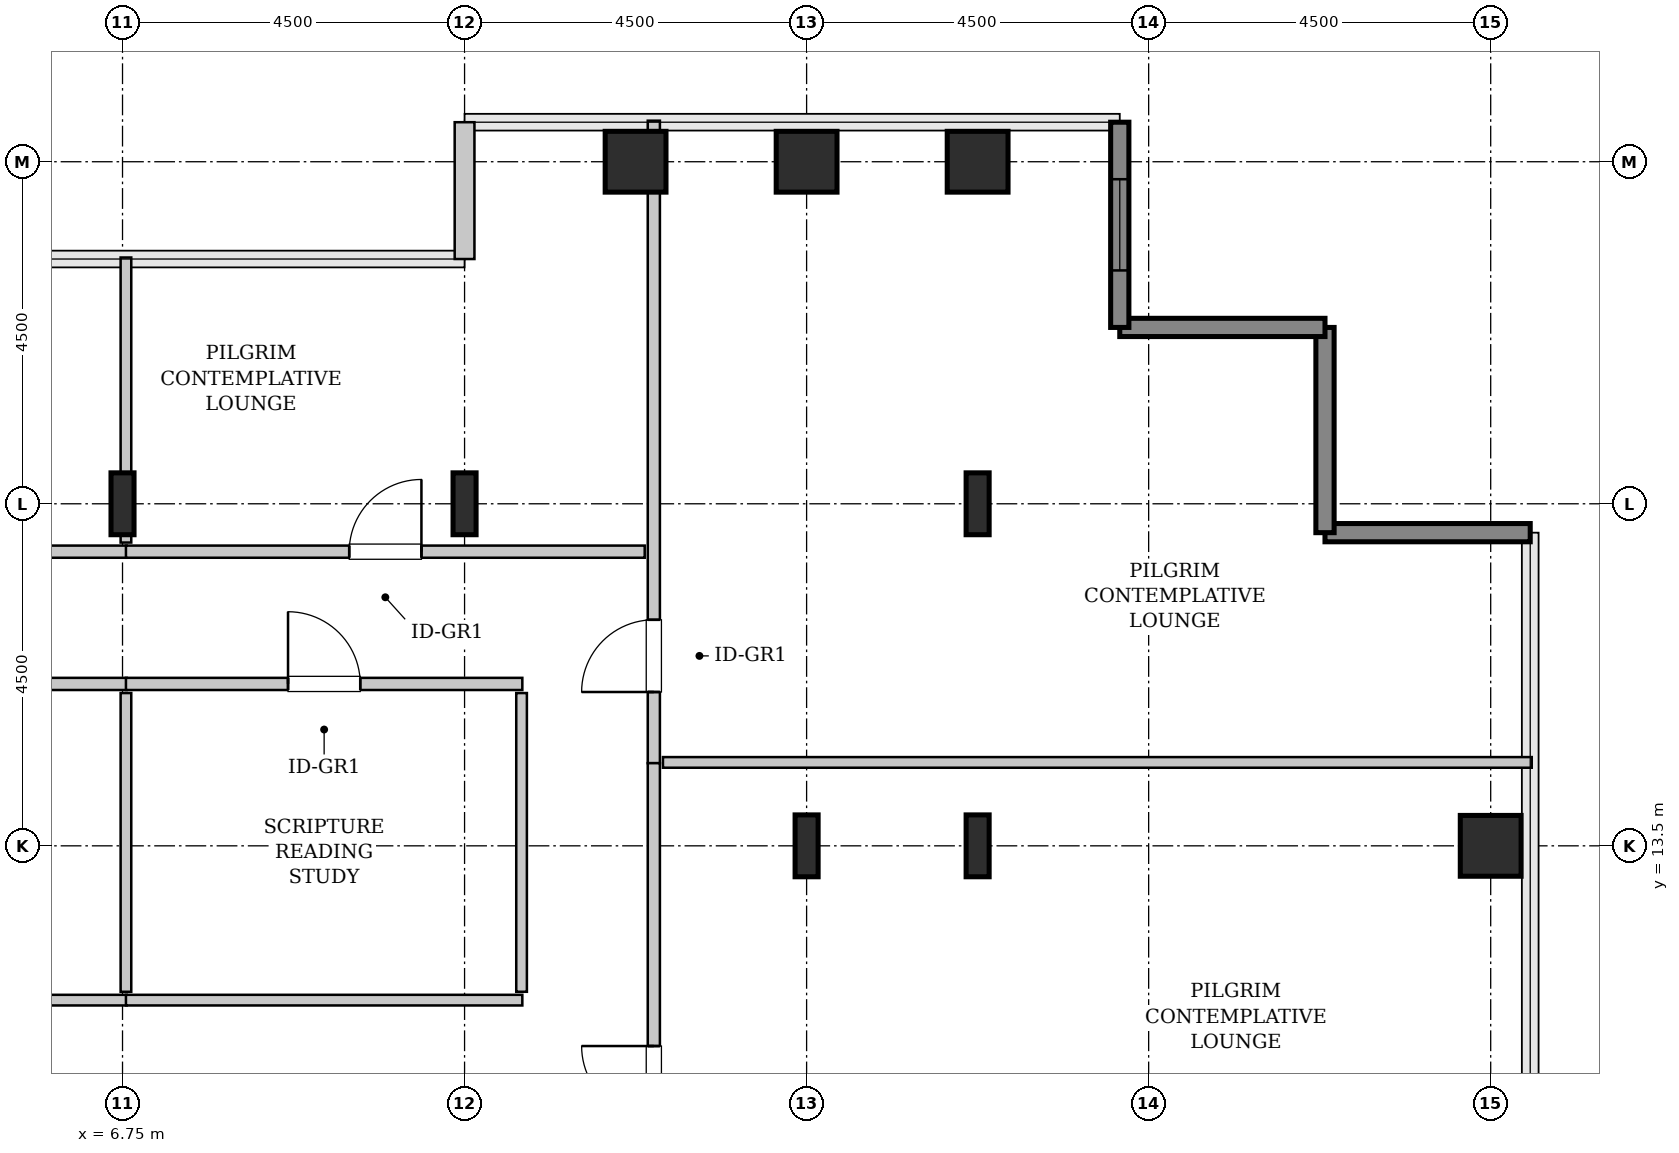
"""IFC4 building model, lengths in metres.
Left out: names, types, materials, properties, quantities, classifications, styles, units other than length and angle.
Written with IfcOpenShell. Run it as: python <this file> out.ifc"""

import sys

from ifc_helpers import new_model, si_unit, direction, frame, frame_2d, origin, origin_2d, place, context, subcontext, project, spatial, rectangle, hollow_rectangle, i_section, extrude, source, transform, mapped, element, fill, save


model = new_model("IFC4")
c1 = context("Model", 3, precision=1e-05, world=origin(), true_north=direction((0.0, 1.0)))
c2 = subcontext(c1, "Body", "Model", "MODEL_VIEW")
j1 = project(units=[si_unit("LENGTHUNIT", "METRE"), si_unit("PLANEANGLEUNIT", "RADIAN")], contexts=[c1])
p1 = place(None, origin())
s1 = spatial("IfcSite", under=j1, at=p1, CompositionType="ELEMENT")
p2 = place(p1, origin())
s2 = spatial("IfcBuilding", under=s1, at=p2, CompositionType="ELEMENT")
p3 = place(p2, frame((0.0, 0.0, 160.2)))
s3 = spatial("IfcBuildingStorey", under=s2, at=p3, CompositionType="ELEMENT", Elevation=160.2)
m1 = source(origin(), c2, "Body", "SweptSolid", [
    extrude(i_section(OverallWidth=0.303, OverallDepth=0.814, WebThickness=0.021, FlangeThickness=0.04, FilletRadius=0.03, at=origin_2d()), origin(), (0.0, 0.0, 1.0), 3.8),
])
for number, where, z_axis, x_axis in (
    (1, (6.75, 18.0, 0.0), (0.0, 0.0, 1.0), (1.0, 0.0, 0.0)),
    (2, (11.25, 18.0, 0.0), (0.0, 0.0, 1.0), (1.0, 0.0, 0.0)),
):
    element("IfcColumn", number, at=place(p3, frame(where, z_axis=z_axis, x_axis=x_axis)), inside=s3, PredefinedType="COLUMN", context=c2, shape_type="MappedRepresentation", body=[
        mapped(m1, transform((0.0, 0.0, 0.0), x_axis=(1.0, 0.0, 0.0), y_axis=(0.0, 1.0, 0.0), z_axis=(0.0, 0.0, 1.0), scale=1.0)),
    ])
m2 = source(origin(), c2, "Body", "SweptSolid", [
    extrude(hollow_rectangle(XDim=0.8, YDim=0.8, WallThickness=0.04, InnerFilletRadius=0.04, OuterFilletRadius=0.08, at=origin_2d()), origin(), (0.0, 0.0, 1.0), 3.8),
])
p4 = place(p3, frame((13.5, 22.5, 0.0), z_axis=(0.0, 0.0, 1.0), x_axis=(1.0, 0.0, 0.0)))
e3 = element("IfcColumn", 3, at=p4, inside=s3, PredefinedType="COLUMN", context=c2, shape_type="MappedRepresentation", body=[
    mapped(m2, transform((0.0, 0.0, 0.0), x_axis=(1.0, 0.0, 0.0), y_axis=(0.0, 1.0, 0.0), z_axis=(0.0, 0.0, 1.0), scale=1.0)),
])
p5 = place(p3, frame((15.75, 13.5, 0.0), z_axis=(0.0, 0.0, 1.0), x_axis=(1.0, 0.0, 0.0)))
e4 = element("IfcColumn", 4, at=p5, inside=s3, PredefinedType="COLUMN", context=c2, shape_type="MappedRepresentation", body=[
    mapped(m1, transform((0.0, 0.0, 0.0), x_axis=(1.0, 0.0, 0.0), y_axis=(0.0, 1.0, 0.0), z_axis=(0.0, 0.0, 1.0), scale=1.0)),
])
p6 = place(p3, frame((15.75, 22.5, 0.0), z_axis=(0.0, 0.0, 1.0), x_axis=(1.0, 0.0, 0.0)))
e5 = element("IfcColumn", 5, at=p6, inside=s3, PredefinedType="COLUMN", context=c2, shape_type="MappedRepresentation", body=[
    mapped(m2, transform((0.0, 0.0, 0.0), x_axis=(1.0, 0.0, 0.0), y_axis=(0.0, 1.0, 0.0), z_axis=(0.0, 0.0, 1.0), scale=1.0)),
])
for number, where, z_axis, x_axis in (
    (6, (18.0, 13.5, 0.0), (0.0, 0.0, 1.0), (1.0, 0.0, 0.0)),
    (7, (18.0, 18.0, 0.0), (0.0, 0.0, 1.0), (1.0, 0.0, 0.0)),
):
    element("IfcColumn", number, at=place(p3, frame(where, z_axis=z_axis, x_axis=x_axis)), inside=s3, PredefinedType="COLUMN", context=c2, shape_type="MappedRepresentation", body=[
        mapped(m1, transform((0.0, 0.0, 0.0), x_axis=(1.0, 0.0, 0.0), y_axis=(0.0, 1.0, 0.0), z_axis=(0.0, 0.0, 1.0), scale=1.0)),
    ])
for number, where, z_axis, x_axis in (
    (8, (18.0, 22.5, 0.0), (0.0, 0.0, 1.0), (1.0, 0.0, 0.0)),
    (9, (24.75, 13.5, 0.0), (0.0, 0.0, 1.0), (1.0, 0.0, 0.0)),
):
    element("IfcColumn", number, at=place(p3, frame(where, z_axis=z_axis, x_axis=x_axis)), inside=s3, PredefinedType="COLUMN", context=c2, shape_type="MappedRepresentation", body=[
        mapped(m2, transform((0.0, 0.0, 0.0), x_axis=(1.0, 0.0, 0.0), y_axis=(0.0, 1.0, 0.0), z_axis=(0.0, 0.0, 1.0), scale=1.0)),
    ])
m3 = source(origin(), c2, "Body", "SweptSolid", [
    extrude(rectangle(XDim=2.7, YDim=0.24, at=frame_2d((1.35, 0.0))), origin(), (0.0, 0.0, 1.0), 3.55),
])
for number, where, z_axis, x_axis in (
    (10, (25.27, 17.62, 0.0), (0.0, 0.0, 1.0), (-1.0, 0.0, 0.0)),
    (11, (22.57, 17.62, 0.0), (0.0, 0.0, 1.0), (0.0, 1.0, 0.0)),
    (12, (22.57, 20.32, 0.0), (0.0, 0.0, 1.0), (-1.0, 0.0, 0.0)),
):
    element("IfcWall", number, at=place(p3, frame(where, z_axis=z_axis, x_axis=x_axis)), inside=s3, PredefinedType="SHEAR", context=c2, shape_type="MappedRepresentation", body=[
        mapped(m3, transform((0.0, 0.0, 0.0), x_axis=(1.0, 0.0, 0.0), y_axis=(0.0, 1.0, 0.0), z_axis=(0.0, 0.0, 1.0), scale=1.0)),
    ])
p7 = place(p3, frame((19.87, 20.32, 0.0), z_axis=(0.0, 0.0, 1.0), x_axis=(0.0, 1.0, 0.0)))
e13 = element("IfcWall", 13, at=p7, inside=s3, PredefinedType="SHEAR", context=c2, shape_type="MappedRepresentation", body=[
    mapped(m3, transform((0.0, 0.0, 0.0), x_axis=(1.0, 0.0, 0.0), y_axis=(0.0, 1.0, 0.0), z_axis=(0.0, 0.0, 1.0), scale=1.0)),
])
p8 = place(p7, frame((0.75, 0.0, 0.85)))
e14 = element("IfcOpeningElement", 14, at=p8, cuts=e13, PredefinedType="OPENING", context=c2, shape_type="SweptSolid", body=[
    extrude(rectangle(XDim=1.2, YDim=1.8, at=frame_2d((0.6, 0.9))), frame((0.0, 0.13, 0.0), z_axis=(0.0, -1.0, 0.0), x_axis=(1.0, 0.0, 0.0)), (0.0, 0.0, 1.0), 0.26),
])
m4 = source(origin(), c2, "Body", "SweptSolid", [
    extrude(rectangle(XDim=1.8, YDim=0.26, at=frame_2d((0.9, 0.0))), origin(), (0.0, 0.0, 1.0), 3.55),
])
p9 = place(p3, frame((11.25, 23.02, 0.0), z_axis=(0.0, 0.0, 1.0), x_axis=(0.0, -1.0, 0.0)))
e15 = element("IfcWall", 15, at=p9, inside=s3, PredefinedType="SOLIDWALL", context=c2, shape_type="MappedRepresentation", body=[
    mapped(m4, transform((0.0, 0.0, 0.0), x_axis=(1.0, 0.0, 0.0), y_axis=(0.0, 1.0, 0.0), z_axis=(0.0, 0.0, 1.0), scale=1.0)),
])
m5 = source(origin(), c2, "Body", "SweptSolid", [
    extrude(rectangle(XDim=8.453, YDim=0.16, at=frame_2d((4.226, 0.0))), origin(), (0.0, 0.0, 1.0), 3.535),
])
p10 = place(p3, frame((13.74, 14.587, 0.0), z_axis=(0.0, 0.0, 1.0), x_axis=(0.0, 1.0, 0.0)))
e16 = element("IfcWall", 16, at=p10, inside=s3, PredefinedType="PARTITIONING", context=c2, shape_type="MappedRepresentation", body=[
    mapped(m5, transform((0.0, 0.0, 0.0), x_axis=(1.0, 0.0, 0.0), y_axis=(0.0, 1.0, 0.0), z_axis=(0.0, 0.0, 1.0), scale=1.0)),
])
p11 = place(p10, frame((0.936, 0.0, 0.0)))
e17 = element("IfcOpeningElement", 17, at=p11, cuts=e16, PredefinedType="OPENING", context=c2, shape_type="SweptSolid", body=[
    extrude(rectangle(XDim=0.95, YDim=2.1, at=frame_2d((0.475, 1.05))), frame((0.0, 0.09, 0.0), z_axis=(0.0, -1.0, 0.0), x_axis=(1.0, 0.0, 0.0)), (0.0, 0.0, 1.0), 0.18),
])
m6 = source(origin(), c2, "Body", "SweptSolid", [
    extrude(rectangle(XDim=11.43, YDim=0.14, at=frame_2d((5.715, 0.0))), origin(), (0.0, 0.0, 1.0), 3.535),
])
p12 = place(p3, frame((13.86, 14.597, 0.0), z_axis=(0.0, 0.0, 1.0), x_axis=(1.0, 0.0, 0.0)))
e18 = element("IfcWall", 18, at=p12, inside=s3, PredefinedType="PARTITIONING", context=c2, shape_type="MappedRepresentation", body=[
    mapped(m6, transform((0.0, 0.0, 0.0), x_axis=(1.0, 0.0, 0.0), y_axis=(0.0, 1.0, 0.0), z_axis=(0.0, 0.0, 1.0), scale=1.0)),
])
m7 = source(origin(), c2, "Body", "SweptSolid", [
    extrude(rectangle(XDim=8.392, YDim=0.16, at=frame_2d((4.196, 0.0))), origin(), (0.0, 0.0, 1.0), 3.535),
])
p13 = place(p3, frame((13.74, 6.195, 0.0), z_axis=(0.0, 0.0, 1.0), x_axis=(0.0, 1.0, 0.0)))
e19 = element("IfcWall", 19, at=p13, inside=s3, PredefinedType="PARTITIONING", context=c2, shape_type="MappedRepresentation", body=[
    mapped(m7, transform((0.0, 0.0, 0.0), x_axis=(1.0, 0.0, 0.0), y_axis=(0.0, 1.0, 0.0), z_axis=(0.0, 0.0, 1.0), scale=1.0)),
])
p14 = place(p13, frame((3.721, 0.0, 0.0)))
e20 = element("IfcOpeningElement", 20, at=p14, cuts=e19, PredefinedType="OPENING", context=c2, shape_type="SweptSolid", body=[
    extrude(rectangle(XDim=0.95, YDim=2.1, at=frame_2d((0.475, 1.05))), frame((0.0, 0.09, 0.0), z_axis=(0.0, -1.0, 0.0), x_axis=(1.0, 0.0, 0.0)), (0.0, 0.0, 1.0), 0.18),
])
m8 = source(origin(), c2, "Body", "SweptSolid", [
    extrude(rectangle(XDim=11.61, YDim=0.16, at=frame_2d((5.805, 0.0))), origin(), (0.0, 0.0, 1.0), 3.535),
])
p15 = place(p3, frame((-4.805, 17.37, 0.0), z_axis=(0.0, 0.0, 1.0), x_axis=(1.0, 0.0, 0.0)))
e21 = element("IfcWall", 21, at=p15, inside=s3, PredefinedType="PARTITIONING", context=c2, shape_type="MappedRepresentation", body=[
    mapped(m8, transform((0.0, 0.0, 0.0), x_axis=(1.0, 0.0, 0.0), y_axis=(0.0, 1.0, 0.0), z_axis=(0.0, 0.0, 1.0), scale=1.0)),
])
p16 = place(p15, frame((5.33, 0.0, 0.0)))
e22 = element("IfcOpeningElement", 22, at=p16, cuts=e21, PredefinedType="OPENING", context=c2, shape_type="SweptSolid", body=[
    extrude(rectangle(XDim=0.95, YDim=2.1, at=frame_2d((0.475, 1.05))), frame((0.0, 0.09, 0.0), z_axis=(0.0, -1.0, 0.0), x_axis=(1.0, 0.0, 0.0)), (0.0, 0.0, 1.0), 0.18),
])
m9 = source(origin(), c2, "Body", "SweptSolid", [
    extrude(rectangle(XDim=3.75, YDim=0.14, at=frame_2d((1.875, 0.0))), origin(), (0.0, 0.0, 1.0), 3.535),
])
p17 = place(p3, frame((6.795, 17.49, 0.0), z_axis=(0.0, 0.0, 1.0), x_axis=(0.0, 1.0, 0.0)))
e23 = element("IfcWall", 23, at=p17, inside=s3, PredefinedType="PARTITIONING", context=c2, shape_type="MappedRepresentation", body=[
    mapped(m9, transform((0.0, 0.0, 0.0), x_axis=(1.0, 0.0, 0.0), y_axis=(0.0, 1.0, 0.0), z_axis=(0.0, 0.0, 1.0), scale=1.0)),
])
p18 = place(p3, frame((-4.805, 15.63, 0.0), z_axis=(0.0, 0.0, 1.0), x_axis=(1.0, 0.0, 0.0)))
e24 = element("IfcWall", 24, at=p18, inside=s3, PredefinedType="PARTITIONING", context=c2, shape_type="MappedRepresentation", body=[
    mapped(m8, transform((0.0, 0.0, 0.0), x_axis=(1.0, 0.0, 0.0), y_axis=(0.0, 1.0, 0.0), z_axis=(0.0, 0.0, 1.0), scale=1.0)),
])
p19 = place(p18, frame((5.33, 0.0, 0.0)))
e25 = element("IfcOpeningElement", 25, at=p19, cuts=e24, PredefinedType="OPENING", context=c2, shape_type="SweptSolid", body=[
    extrude(rectangle(XDim=0.95, YDim=2.1, at=frame_2d((0.475, 1.05))), frame((0.0, 0.09, 0.0), z_axis=(0.0, -1.0, 0.0), x_axis=(1.0, 0.0, 0.0)), (0.0, 0.0, 1.0), 0.18),
])
m10 = source(origin(), c2, "Body", "SweptSolid", [
    extrude(rectangle(XDim=11.61, YDim=0.14, at=frame_2d((5.805, 0.0))), origin(), (0.0, 0.0, 1.0), 3.535),
])
p20 = place(p3, frame((-4.805, 11.47, 0.0), z_axis=(0.0, 0.0, 1.0), x_axis=(1.0, 0.0, 0.0)))
e26 = element("IfcWall", 26, at=p20, inside=s3, PredefinedType="PARTITIONING", context=c2, shape_type="MappedRepresentation", body=[
    mapped(m10, transform((0.0, 0.0, 0.0), x_axis=(1.0, 0.0, 0.0), y_axis=(0.0, 1.0, 0.0), z_axis=(0.0, 0.0, 1.0), scale=1.0)),
])
m11 = source(origin(), c2, "Body", "SweptSolid", [
    extrude(rectangle(XDim=3.93, YDim=0.14, at=frame_2d((1.965, 0.0))), origin(), (0.0, 0.0, 1.0), 3.535),
])
p21 = place(p3, frame((6.795, 11.58, 0.0), z_axis=(0.0, 0.0, 1.0), x_axis=(0.0, 1.0, 0.0)))
e27 = element("IfcWall", 27, at=p21, inside=s3, PredefinedType="PARTITIONING", context=c2, shape_type="MappedRepresentation", body=[
    mapped(m11, transform((0.0, 0.0, 0.0), x_axis=(1.0, 0.0, 0.0), y_axis=(0.0, 1.0, 0.0), z_axis=(0.0, 0.0, 1.0), scale=1.0)),
])
m12 = source(origin(), c2, "Body", "SweptSolid", [
    extrude(rectangle(XDim=6.825, YDim=0.16, at=frame_2d((3.413, 0.0))), origin(), (0.0, 0.0, 1.0), 3.535),
])
p22 = place(p3, frame((6.795, 17.37, 0.0), z_axis=(0.0, 0.0, 1.0), x_axis=(1.0, 0.0, 0.0)))
e28 = element("IfcWall", 28, at=p22, inside=s3, PredefinedType="PARTITIONING", context=c2, shape_type="MappedRepresentation", body=[
    mapped(m12, transform((0.0, 0.0, 0.0), x_axis=(1.0, 0.0, 0.0), y_axis=(0.0, 1.0, 0.0), z_axis=(0.0, 0.0, 1.0), scale=1.0)),
])
p23 = place(p22, frame((2.938, 0.0, 0.0)))
e29 = element("IfcOpeningElement", 29, at=p23, cuts=e28, PredefinedType="OPENING", context=c2, shape_type="SweptSolid", body=[
    extrude(rectangle(XDim=0.95, YDim=2.1, at=frame_2d((0.475, 1.05))), frame((0.0, 0.09, 0.0), z_axis=(0.0, -1.0, 0.0), x_axis=(1.0, 0.0, 0.0)), (0.0, 0.0, 1.0), 0.18),
])
m13 = source(origin(), c2, "Body", "SweptSolid", [
    extrude(rectangle(XDim=5.215, YDim=0.16, at=frame_2d((2.607, 0.0))), origin(), (0.0, 0.0, 1.0), 3.535),
])
p24 = place(p3, frame((6.795, 15.63, 0.0), z_axis=(0.0, 0.0, 1.0), x_axis=(1.0, 0.0, 0.0)))
e30 = element("IfcWall", 30, at=p24, inside=s3, PredefinedType="PARTITIONING", context=c2, shape_type="MappedRepresentation", body=[
    mapped(m13, transform((0.0, 0.0, 0.0), x_axis=(1.0, 0.0, 0.0), y_axis=(0.0, 1.0, 0.0), z_axis=(0.0, 0.0, 1.0), scale=1.0)),
])
p25 = place(p24, frame((2.133, 0.0, 0.0)))
e31 = element("IfcOpeningElement", 31, at=p25, cuts=e30, PredefinedType="OPENING", context=c2, shape_type="SweptSolid", body=[
    extrude(rectangle(XDim=0.95, YDim=2.1, at=frame_2d((0.475, 1.05))), frame((0.0, 0.09, 0.0), z_axis=(0.0, -1.0, 0.0), x_axis=(1.0, 0.0, 0.0)), (0.0, 0.0, 1.0), 0.18),
])
m14 = source(origin(), c2, "Body", "SweptSolid", [
    extrude(rectangle(XDim=5.215, YDim=0.14, at=frame_2d((2.607, 0.0))), origin(), (0.0, 0.0, 1.0), 3.535),
])
p26 = place(p3, frame((6.795, 11.47, 0.0), z_axis=(0.0, 0.0, 1.0), x_axis=(1.0, 0.0, 0.0)))
e32 = element("IfcWall", 32, at=p26, inside=s3, PredefinedType="PARTITIONING", context=c2, shape_type="MappedRepresentation", body=[
    mapped(m14, transform((0.0, 0.0, 0.0), x_axis=(1.0, 0.0, 0.0), y_axis=(0.0, 1.0, 0.0), z_axis=(0.0, 0.0, 1.0), scale=1.0)),
])
p27 = place(p3, frame((12.0, 11.58, 0.0), z_axis=(0.0, 0.0, 1.0), x_axis=(0.0, 1.0, 0.0)))
e33 = element("IfcWall", 33, at=p27, inside=s3, PredefinedType="PARTITIONING", context=c2, shape_type="MappedRepresentation", body=[
    mapped(m11, transform((0.0, 0.0, 0.0), x_axis=(1.0, 0.0, 0.0), y_axis=(0.0, 1.0, 0.0), z_axis=(0.0, 0.0, 1.0), scale=1.0)),
])
m15 = source(origin(), c2, "Body", "SweptSolid", [
    extrude(rectangle(XDim=1.2, YDim=1.8, at=frame_2d((0.6, 0.9))), frame((0.0, 0.03, 0.0), z_axis=(0.0, -1.0, 0.0), x_axis=(1.0, 0.0, 0.0)), (0.0, 0.0, 1.0), 0.06),
])
p28 = place(p8, origin())
e34 = element("IfcWindow", 34, at=p28, inside=s3, PartitioningType="SINGLE_PANEL", PredefinedType="WINDOW", context=c2, shape_type="MappedRepresentation", body=[
    mapped(m15, transform((0.0, 0.0, 0.0), x_axis=(1.0, 0.0, 0.0), y_axis=(0.0, 1.0, 0.0), z_axis=(0.0, 0.0, 1.0), scale=1.0)),
])
fill(e14, e34)
m16 = source(origin(), c2, "Body", "SweptSolid", [
    extrude(rectangle(XDim=0.95, YDim=2.1, at=frame_2d((0.475, 1.05))), frame((0.0, 0.025, 0.0), z_axis=(0.0, -1.0, 0.0), x_axis=(1.0, 0.0, 0.0)), (0.0, 0.0, 1.0), 0.05),
])
p29 = place(p11, origin())
e35 = element("IfcDoor", 35, at=p29, inside=s3, OperationType="SINGLE_SWING_LEFT", PredefinedType="DOOR", context=c2, shape_type="MappedRepresentation", body=[
    mapped(m16, transform((0.0, 0.0, 0.0), x_axis=(1.0, 0.0, 0.0), y_axis=(0.0, 1.0, 0.0), z_axis=(0.0, 0.0, 1.0), scale=1.0)),
])
fill(e17, e35)
p30 = place(p14, origin())
e36 = element("IfcDoor", 36, at=p30, inside=s3, OperationType="SINGLE_SWING_RIGHT", PredefinedType="DOOR", context=c2, shape_type="MappedRepresentation", body=[
    mapped(m16, transform((0.0, 0.0, 0.0), x_axis=(1.0, 0.0, 0.0), y_axis=(0.0, 1.0, 0.0), z_axis=(0.0, 0.0, 1.0), scale=1.0)),
])
fill(e20, e36)
p31 = place(p23, origin())
e37 = element("IfcDoor", 37, at=p31, inside=s3, OperationType="SINGLE_SWING_RIGHT", PredefinedType="DOOR", context=c2, shape_type="MappedRepresentation", body=[
    mapped(m16, transform((0.0, 0.0, 0.0), x_axis=(1.0, 0.0, 0.0), y_axis=(0.0, 1.0, 0.0), z_axis=(0.0, 0.0, 1.0), scale=1.0)),
])
fill(e29, e37)
p32 = place(p25, origin())
e38 = element("IfcDoor", 38, at=p32, inside=s3, OperationType="SINGLE_SWING_LEFT", PredefinedType="DOOR", context=c2, shape_type="MappedRepresentation", body=[
    mapped(m16, transform((0.0, 0.0, 0.0), x_axis=(1.0, 0.0, 0.0), y_axis=(0.0, 1.0, 0.0), z_axis=(0.0, 0.0, 1.0), scale=1.0)),
])
fill(e31, e38)
save(model, sys.argv[1])
